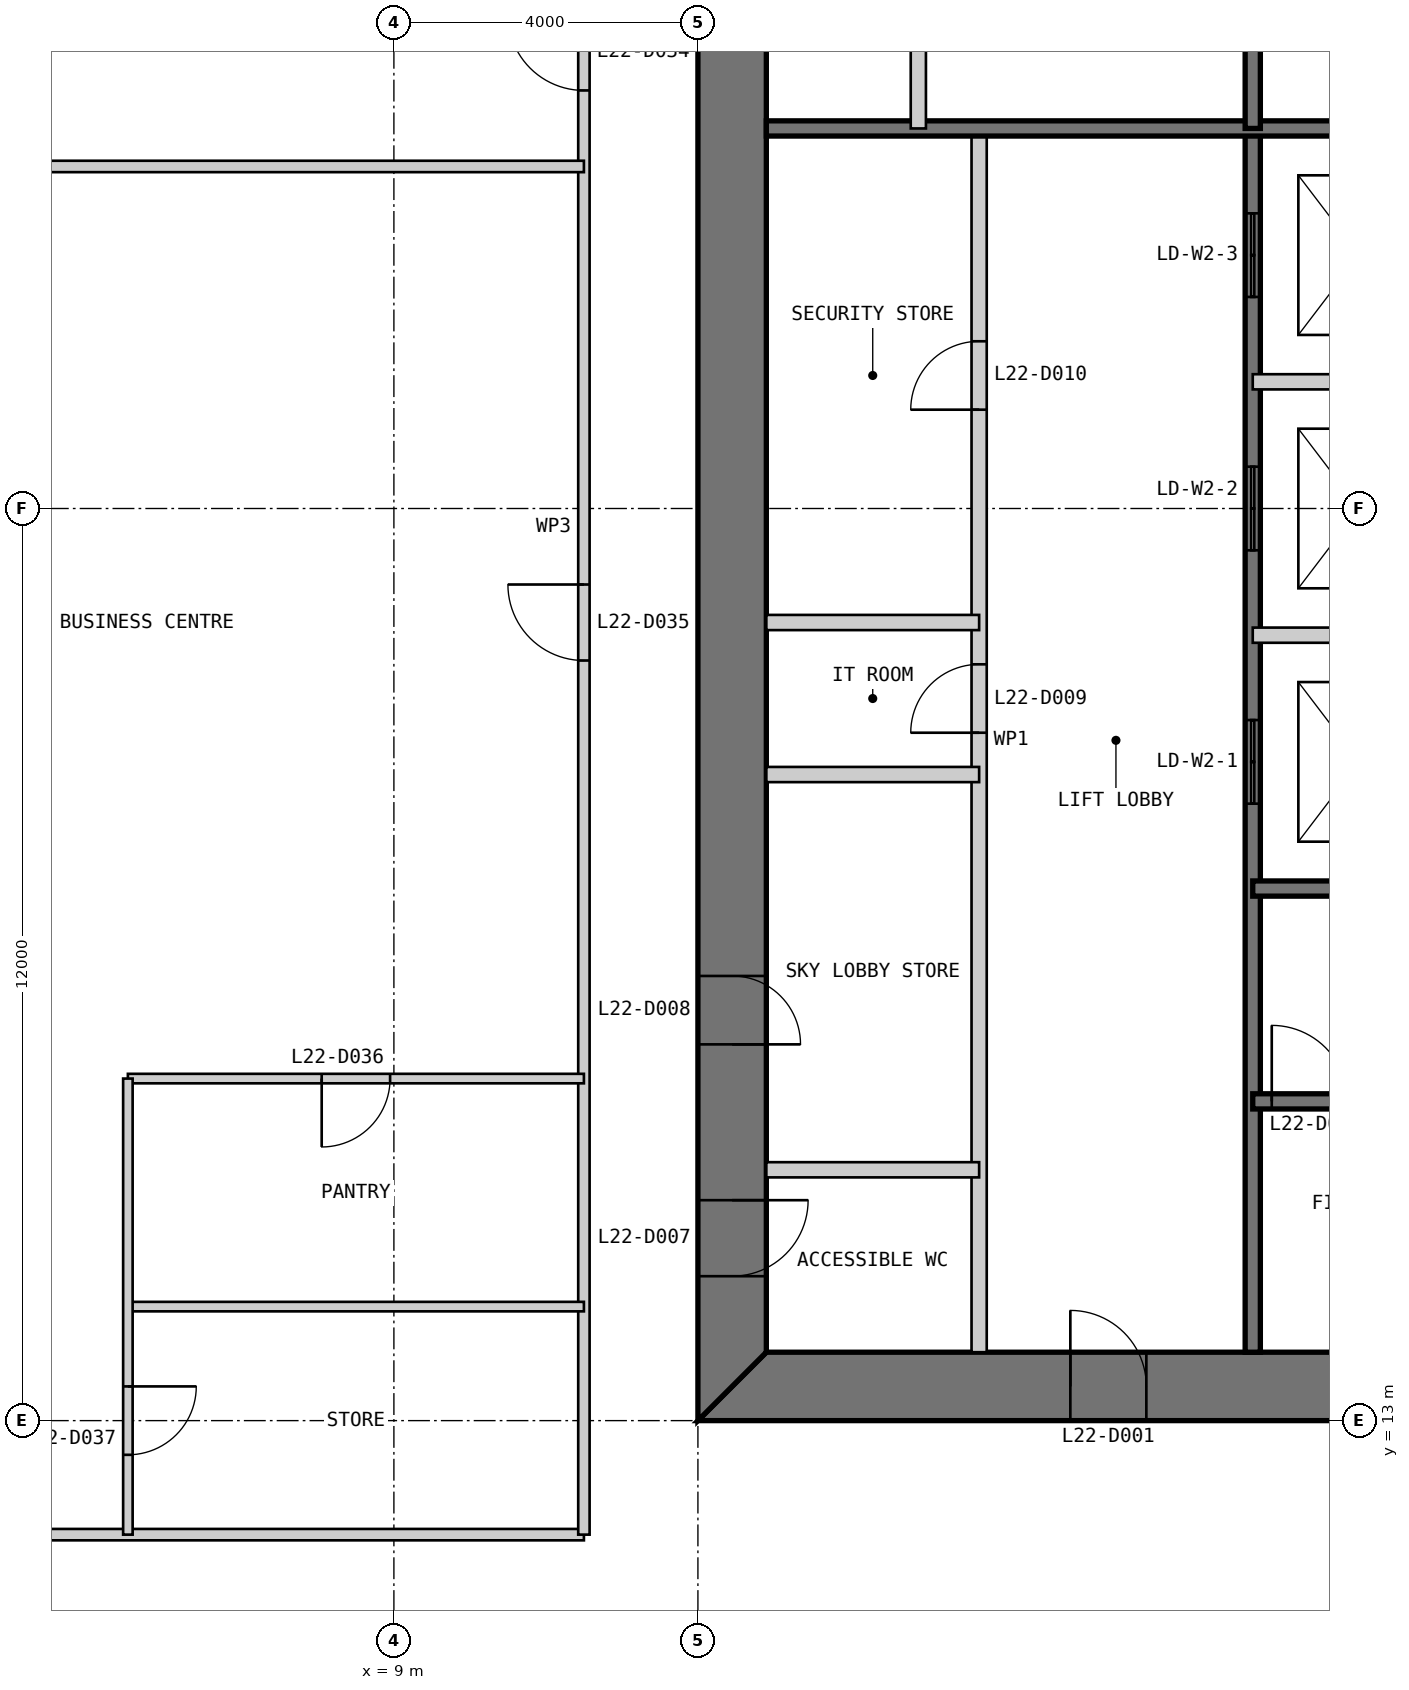
"""IFC4 building model, lengths in metres.
Left out: names, types, materials, properties, quantities, classifications, styles, units other than length and angle.
Written with IfcOpenShell. Run it as: python <this file> out.ifc"""

import sys

from ifc_helpers import new_model, si_unit, direction, frame, frame_2d, origin, place, context, subcontext, project, spatial, polyline, rectangle, outline, extrude, element, fill, save


model = new_model("IFC4")
c1 = context("Model", 3, precision=1e-05, world=origin(), true_north=direction((0.0, 1.0)))
c2 = subcontext(c1, "Body", "Model", "MODEL_VIEW")
j1 = project(units=[si_unit("LENGTHUNIT", "METRE"), si_unit("PLANEANGLEUNIT", "RADIAN")], contexts=[c1])
p1 = place(None, origin())
s1 = spatial("IfcSite", under=j1, at=p1, CompositionType="ELEMENT")
p2 = place(p1, origin())
s2 = spatial("IfcBuilding", under=s1, at=p2, CompositionType="ELEMENT")
p3 = place(p2, frame((0.0, 0.0, 97.0)))
s3 = spatial("IfcBuildingStorey", under=s2, at=p3, CompositionType="ELEMENT", Elevation=97.0)
p4 = place(p3, frame((13.0, 13.45, 0.0), z_axis=(0.0, 0.0, 1.0), x_axis=(1.0, 0.0, 0.0)))
e1 = element("IfcWall", 1, at=p4, inside=s3, PredefinedType="SHEAR", context=c2, shape_type="SweptSolid", body=[
    extrude(outline(polyline([(0.0, -0.45), (24.0, -0.45), (23.1, 0.45), (0.9, 0.45), (0.0, -0.45)])), origin(), (0.0, 0.0, 1.0), 5.4),
])
p5 = place(p4, frame((4.9, 0.0, 0.0)))
e2 = element("IfcOpeningElement", 2, at=p5, cuts=e1, PredefinedType="OPENING", context=c2, shape_type="SweptSolid", body=[
    extrude(rectangle(XDim=1.0, YDim=2.2, at=frame_2d((0.5, 1.1))), frame((0.0, 0.46, 0.0), z_axis=(0.0, -1.0, 0.0), x_axis=(1.0, 0.0, 0.0)), (0.0, 0.0, 1.0), 0.92),
])
p6 = place(p4, frame((8.9, 0.0, 0.0)))
e3 = element("IfcOpeningElement", 3, at=p6, cuts=e1, PredefinedType="OPENING", context=c2, shape_type="SweptSolid", body=[
    extrude(rectangle(XDim=1.1, YDim=2.2, at=frame_2d((0.55, 1.1))), frame((0.0, 0.46, 0.0), z_axis=(0.0, -1.0, 0.0), x_axis=(1.0, 0.0, 0.0)), (0.0, 0.0, 1.0), 0.92),
])
p7 = place(p4, frame((15.05, 0.0, 0.0)))
e4 = element("IfcOpeningElement", 4, at=p7, cuts=e1, PredefinedType="OPENING", context=c2, shape_type="SweptSolid", body=[
    extrude(rectangle(XDim=0.9, YDim=2.2, at=frame_2d((0.45, 1.1))), frame((0.0, 0.46, 0.0), z_axis=(0.0, -1.0, 0.0), x_axis=(1.0, 0.0, 0.0)), (0.0, 0.0, 1.0), 0.92),
])
p8 = place(p4, frame((17.9, 0.0, 0.0)))
e5 = element("IfcOpeningElement", 5, at=p8, cuts=e1, PredefinedType="OPENING", context=c2, shape_type="SweptSolid", body=[
    extrude(rectangle(XDim=1.0, YDim=2.2, at=frame_2d((0.5, 1.1))), frame((0.0, 0.46, 0.0), z_axis=(0.0, -1.0, 0.0), x_axis=(1.0, 0.0, 0.0)), (0.0, 0.0, 1.0), 0.92),
])
p9 = place(p4, frame((21.4, 0.0, 0.0)))
e6 = element("IfcOpeningElement", 6, at=p9, cuts=e1, PredefinedType="OPENING", context=c2, shape_type="SweptSolid", body=[
    extrude(rectangle(XDim=1.0, YDim=2.2, at=frame_2d((0.5, 1.1))), frame((0.0, 0.46, 0.0), z_axis=(0.0, -1.0, 0.0), x_axis=(1.0, 0.0, 0.0)), (0.0, 0.0, 1.0), 0.92),
])
p10 = place(p3, frame((13.45, 36.1, 0.0), z_axis=(0.0, 0.0, 1.0), x_axis=(0.0, -1.0, 0.0)))
e7 = element("IfcWall", 7, at=p10, inside=s3, PredefinedType="SHEAR", context=c2, shape_type="SweptSolid", body=[
    extrude(outline(polyline([(-0.9, -0.45), (23.1, -0.45), (22.2, 0.45), (0.0, 0.45), (-0.9, -0.45)])), origin(), (0.0, 0.0, 1.0), 5.4),
])
p11 = place(p10, frame((20.2, 0.0, 0.0)))
e8 = element("IfcOpeningElement", 8, at=p11, cuts=e7, PredefinedType="OPENING", context=c2, shape_type="SweptSolid", body=[
    extrude(rectangle(XDim=1.0, YDim=2.2, at=frame_2d((0.5, 1.1))), frame((0.0, 0.46, 0.0), z_axis=(0.0, -1.0, 0.0), x_axis=(1.0, 0.0, 0.0)), (0.0, 0.0, 1.0), 0.92),
])
p12 = place(p10, frame((17.25, 0.0, 0.0)))
e9 = element("IfcOpeningElement", 9, at=p12, cuts=e7, PredefinedType="OPENING", context=c2, shape_type="SweptSolid", body=[
    extrude(rectangle(XDim=0.9, YDim=2.2, at=frame_2d((0.45, 1.1))), frame((0.0, 0.46, 0.0), z_axis=(0.0, -1.0, 0.0), x_axis=(1.0, 0.0, 0.0)), (0.0, 0.0, 1.0), 0.92),
])
p13 = place(p3, frame((16.7, 13.9, 0.0), z_axis=(0.0, 0.0, 1.0), x_axis=(0.0, 1.0, 0.0)))
e10 = element("IfcWall", 10, at=p13, inside=s3, PredefinedType="PARTITIONING", context=c2, shape_type="SweptSolid", body=[
    extrude(rectangle(XDim=16.1, YDim=0.2, at=frame_2d((8.05, 0.0))), origin(), (0.0, 0.0, 1.0), 5.2),
])
p14 = place(p13, frame((8.15, 0.0, 0.0)))
e11 = element("IfcOpeningElement", 11, at=p14, cuts=e10, PredefinedType="OPENING", context=c2, shape_type="SweptSolid", body=[
    extrude(rectangle(XDim=0.9, YDim=2.2, at=frame_2d((0.45, 1.1))), frame((0.0, 0.11, 0.0), z_axis=(0.0, -1.0, 0.0), x_axis=(1.0, 0.0, 0.0)), (0.0, 0.0, 1.0), 0.22),
])
p15 = place(p13, frame((12.4, 0.0, 0.0)))
e12 = element("IfcOpeningElement", 12, at=p15, cuts=e10, PredefinedType="OPENING", context=c2, shape_type="SweptSolid", body=[
    extrude(rectangle(XDim=0.9, YDim=2.2, at=frame_2d((0.45, 1.1))), frame((0.0, 0.11, 0.0), z_axis=(0.0, -1.0, 0.0), x_axis=(1.0, 0.0, 0.0)), (0.0, 0.0, 1.0), 0.22),
])
p16 = place(p3, frame((20.3, 13.9, 0.0), z_axis=(0.0, 0.0, 1.0), x_axis=(0.0, 1.0, 0.0)))
e13 = element("IfcWall", 13, at=p16, inside=s3, PredefinedType="SOLIDWALL", context=c2, shape_type="SweptSolid", body=[
    extrude(rectangle(XDim=16.1, YDim=0.2, at=frame_2d((8.05, 0.0))), origin(), (0.0, 0.0, 1.0), 5.2),
])
p17 = place(p16, frame((7.217, 0.0, 0.0)))
e14 = element("IfcOpeningElement", 14, at=p17, cuts=e13, PredefinedType="OPENING", context=c2, shape_type="SweptSolid", body=[
    extrude(rectangle(XDim=1.1, YDim=2.2, at=frame_2d((0.55, 1.1))), frame((0.0, 0.11, 0.0), z_axis=(0.0, -1.0, 0.0), x_axis=(1.0, 0.0, 0.0)), (0.0, 0.0, 1.0), 0.22),
])
p18 = place(p16, frame((10.55, 0.0, 0.0)))
e15 = element("IfcOpeningElement", 15, at=p18, cuts=e13, PredefinedType="OPENING", context=c2, shape_type="SweptSolid", body=[
    extrude(rectangle(XDim=1.1, YDim=2.2, at=frame_2d((0.55, 1.1))), frame((0.0, 0.11, 0.0), z_axis=(0.0, -1.0, 0.0), x_axis=(1.0, 0.0, 0.0)), (0.0, 0.0, 1.0), 0.22),
])
p19 = place(p16, frame((13.883, 0.0, 0.0)))
e16 = element("IfcOpeningElement", 16, at=p19, cuts=e13, PredefinedType="OPENING", context=c2, shape_type="SweptSolid", body=[
    extrude(rectangle(XDim=1.1, YDim=2.2, at=frame_2d((0.55, 1.1))), frame((0.0, 0.11, 0.0), z_axis=(0.0, -1.0, 0.0), x_axis=(1.0, 0.0, 0.0)), (0.0, 0.0, 1.0), 0.22),
])
for number, where, z_axis, x_axis in (
    (17, (20.3, 23.333, 0.0), (0.0, 0.0, 1.0), (1.0, 0.0, 0.0)),
    (18, (20.3, 26.667, 0.0), (0.0, 0.0, 1.0), (1.0, 0.0, 0.0)),
):
    element("IfcWall", number, at=place(p3, frame(where, z_axis=z_axis, x_axis=x_axis)), inside=s3, PredefinedType="PARTITIONING", context=c2, shape_type="SweptSolid", body=[
        extrude(rectangle(XDim=2.8, YDim=0.2, at=frame_2d((1.4, 0.0))), origin(), (0.0, 0.0, 1.0), 5.2),
    ])
p20 = place(p3, frame((20.3, 17.2, 0.0), z_axis=(0.0, 0.0, 1.0), x_axis=(1.0, 0.0, 0.0)))
e19 = element("IfcWall", 19, at=p20, inside=s3, PredefinedType="SOLIDWALL", context=c2, shape_type="SweptSolid", body=[
    extrude(rectangle(XDim=9.4, YDim=0.2, at=frame_2d((4.7, 0.0))), origin(), (0.0, 0.0, 1.0), 5.2),
])
p21 = place(p20, frame((0.25, 0.0, 0.0)))
e20 = element("IfcOpeningElement", 20, at=p21, cuts=e19, PredefinedType="OPENING", context=c2, shape_type="SweptSolid", body=[
    extrude(rectangle(XDim=1.0, YDim=2.2, at=frame_2d((0.5, 1.1))), frame((0.0, 0.11, 0.0), z_axis=(0.0, -1.0, 0.0), x_axis=(1.0, 0.0, 0.0)), (0.0, 0.0, 1.0), 0.22),
])
p22 = place(p3, frame((20.3, 20.0, 0.0), z_axis=(0.0, 0.0, 1.0), x_axis=(1.0, 0.0, 0.0)))
e21 = element("IfcWall", 21, at=p22, inside=s3, PredefinedType="SOLIDWALL", context=c2, shape_type="SweptSolid", body=[
    extrude(rectangle(XDim=15.8, YDim=0.2, at=frame_2d((7.9, 0.0))), origin(), (0.0, 0.0, 1.0), 5.2),
])
for number, where, z_axis, x_axis in (
    (22, (13.9, 16.3, 0.0), (0.0, 0.0, 1.0), (1.0, 0.0, 0.0)),
    (23, (13.9, 21.5, 0.0), (0.0, 0.0, 1.0), (1.0, 0.0, 0.0)),
    (24, (13.9, 23.5, 0.0), (0.0, 0.0, 1.0), (1.0, 0.0, 0.0)),
):
    element("IfcWall", number, at=place(p3, frame(where, z_axis=z_axis, x_axis=x_axis)), inside=s3, PredefinedType="PARTITIONING", context=c2, shape_type="SweptSolid", body=[
        extrude(rectangle(XDim=2.8, YDim=0.2, at=frame_2d((1.4, 0.0))), origin(), (0.0, 0.0, 1.0), 5.2),
    ])
p23 = place(p3, frame((29.7, 30.0, 0.0), z_axis=(0.0, 0.0, 1.0), x_axis=(-1.0, 0.0, 0.0)))
e25 = element("IfcWall", 25, at=p23, inside=s3, PredefinedType="SOLIDWALL", context=c2, shape_type="SweptSolid", body=[
    extrude(rectangle(XDim=15.8, YDim=0.2, at=frame_2d((7.9, 0.0))), origin(), (0.0, 0.0, 1.0), 5.2),
])
p24 = place(p3, frame((20.3, 36.1, 0.0), z_axis=(0.0, 0.0, 1.0), x_axis=(0.0, -1.0, 0.0)))
e26 = element("IfcWall", 26, at=p24, inside=s3, PredefinedType="SOLIDWALL", context=c2, shape_type="SweptSolid", body=[
    extrude(rectangle(XDim=6.1, YDim=0.2, at=frame_2d((3.05, 0.0))), origin(), (0.0, 0.0, 1.0), 5.2),
])
p25 = place(p3, frame((15.9, 36.1, 0.0), z_axis=(0.0, 0.0, 1.0), x_axis=(0.0, -1.0, 0.0)))
e27 = element("IfcWall", 27, at=p25, inside=s3, PredefinedType="PARTITIONING", context=c2, shape_type="SweptSolid", body=[
    extrude(rectangle(XDim=6.1, YDim=0.2, at=frame_2d((3.05, 0.0))), origin(), (0.0, 0.0, 1.0), 5.2),
])
p26 = place(p3, frame((0.15, 11.5, 0.0), z_axis=(0.0, 0.0, 1.0), x_axis=(1.0, 0.0, 0.0)))
e28 = element("IfcWall", 28, at=p26, inside=s3, PredefinedType="PARTITIONING", context=c2, shape_type="SweptSolid", body=[
    extrude(rectangle(XDim=11.35, YDim=0.15, at=frame_2d((5.675, 0.0))), origin(), (0.0, 0.0, 1.0), 5.25),
])
p27 = place(p3, frame((11.5, 38.5, 0.0), z_axis=(0.0, 0.0, 1.0), x_axis=(0.0, -1.0, 0.0)))
e29 = element("IfcWall", 29, at=p27, inside=s3, PredefinedType="PARTITIONING", context=c2, shape_type="SweptSolid", body=[
    extrude(rectangle(XDim=27.0, YDim=0.15, at=frame_2d((13.5, 0.0))), origin(), (0.0, 0.0, 1.0), 5.25),
])
p28 = place(p27, frame((2.5, 0.0, 0.0)))
e30 = element("IfcOpeningElement", 30, at=p28, cuts=e29, PredefinedType="OPENING", context=c2, shape_type="SweptSolid", body=[
    extrude(rectangle(XDim=1.0, YDim=2.2, at=frame_2d((0.5, 1.1))), frame((0.0, 0.085, 0.0), z_axis=(0.0, -1.0, 0.0), x_axis=(1.0, 0.0, 0.0)), (0.0, 0.0, 1.0), 0.17),
])
p29 = place(p27, frame((7.0, 0.0, 0.0)))
e31 = element("IfcOpeningElement", 31, at=p29, cuts=e29, PredefinedType="OPENING", context=c2, shape_type="SweptSolid", body=[
    extrude(rectangle(XDim=1.0, YDim=2.2, at=frame_2d((0.5, 1.1))), frame((0.0, 0.085, 0.0), z_axis=(0.0, -1.0, 0.0), x_axis=(1.0, 0.0, 0.0)), (0.0, 0.0, 1.0), 0.17),
])
p30 = place(p27, frame((14.5, 0.0, 0.0)))
e32 = element("IfcOpeningElement", 32, at=p30, cuts=e29, PredefinedType="OPENING", context=c2, shape_type="SweptSolid", body=[
    extrude(rectangle(XDim=1.0, YDim=2.2, at=frame_2d((0.5, 1.1))), frame((0.0, 0.085, 0.0), z_axis=(0.0, -1.0, 0.0), x_axis=(1.0, 0.0, 0.0)), (0.0, 0.0, 1.0), 0.17),
])
p31 = place(p3, frame((0.15, 29.5, 0.0), z_axis=(0.0, 0.0, 1.0), x_axis=(1.0, 0.0, 0.0)))
e33 = element("IfcWall", 33, at=p31, inside=s3, PredefinedType="PARTITIONING", context=c2, shape_type="SweptSolid", body=[
    extrude(rectangle(XDim=11.35, YDim=0.15, at=frame_2d((5.675, 0.0))), origin(), (0.0, 0.0, 1.0), 5.25),
])
p32 = place(p3, frame((5.5, 17.5, 0.0), z_axis=(0.0, 0.0, 1.0), x_axis=(1.0, 0.0, 0.0)))
e34 = element("IfcWall", 34, at=p32, inside=s3, PredefinedType="PARTITIONING", context=c2, shape_type="SweptSolid", body=[
    extrude(rectangle(XDim=6.0, YDim=0.125, at=frame_2d((3.0, 0.0))), origin(), (0.0, 0.0, 1.0), 5.25),
])
p33 = place(p32, frame((2.55, 0.0, 0.0)))
e35 = element("IfcOpeningElement", 35, at=p33, cuts=e34, PredefinedType="OPENING", context=c2, shape_type="SweptSolid", body=[
    extrude(rectangle(XDim=0.9, YDim=2.2, at=frame_2d((0.45, 1.1))), frame((0.0, 0.073, 0.0), z_axis=(0.0, -1.0, 0.0), x_axis=(1.0, 0.0, 0.0)), (0.0, 0.0, 1.0), 0.145),
])
p34 = place(p3, frame((5.5, 14.5, 0.0), z_axis=(0.0, 0.0, 1.0), x_axis=(1.0, 0.0, 0.0)))
e36 = element("IfcWall", 36, at=p34, inside=s3, PredefinedType="PARTITIONING", context=c2, shape_type="SweptSolid", body=[
    extrude(rectangle(XDim=6.0, YDim=0.125, at=frame_2d((3.0, 0.0))), origin(), (0.0, 0.0, 1.0), 5.25),
])
p35 = place(p3, frame((5.5, 17.5, 0.0), z_axis=(0.0, 0.0, 1.0), x_axis=(0.0, -1.0, 0.0)))
e37 = element("IfcWall", 37, at=p35, inside=s3, PredefinedType="PARTITIONING", context=c2, shape_type="SweptSolid", body=[
    extrude(rectangle(XDim=6.0, YDim=0.125, at=frame_2d((3.0, 0.0))), origin(), (0.0, 0.0, 1.0), 5.25),
])
p36 = place(p35, frame((4.05, 0.0, 0.0)))
e38 = element("IfcOpeningElement", 38, at=p36, cuts=e37, PredefinedType="OPENING", context=c2, shape_type="SweptSolid", body=[
    extrude(rectangle(XDim=0.9, YDim=2.2, at=frame_2d((0.45, 1.1))), frame((0.0, 0.073, 0.0), z_axis=(0.0, -1.0, 0.0), x_axis=(1.0, 0.0, 0.0)), (0.0, 0.0, 1.0), 0.145),
])
p37 = place(p5, origin())
e39 = element("IfcDoor", 39, at=p37, inside=s3, OperationType="SINGLE_SWING_LEFT", PredefinedType="DOOR", context=c2, shape_type="SweptSolid", body=[
    extrude(rectangle(XDim=1.0, YDim=2.2, at=frame_2d((0.5, 1.1))), frame((0.0, 0.025, 0.0), z_axis=(0.0, -1.0, 0.0), x_axis=(1.0, 0.0, 0.0)), (0.0, 0.0, 1.0), 0.05),
    extrude(outline(polyline([(0.0, 0.0), (0.04, 0.0), (0.04, 2.16), (0.96, 2.16), (0.96, 0.0), (1.0, 0.0), (1.0, 2.2), (0.0, 2.2), (0.0, 0.0)])), frame((0.0, 0.3, 0.0), z_axis=(0.0, -1.0, 0.0), x_axis=(1.0, 0.0, 0.0)), (0.0, 0.0, 1.0), 0.6),
])
fill(e2, e39)
p38 = place(p21, origin())
e40 = element("IfcDoor", 40, at=p38, inside=s3, OperationType="SINGLE_SWING_LEFT", PredefinedType="DOOR", context=c2, shape_type="SweptSolid", body=[
    extrude(rectangle(XDim=1.0, YDim=2.2, at=frame_2d((0.5, 1.1))), frame((0.0, 0.025, 0.0), z_axis=(0.0, -1.0, 0.0), x_axis=(1.0, 0.0, 0.0)), (0.0, 0.0, 1.0), 0.05),
])
fill(e20, e40)
p39 = place(p11, origin())
e41 = element("IfcDoor", 41, at=p39, inside=s3, OperationType="SINGLE_SWING_LEFT", PredefinedType="DOOR", context=c2, shape_type="SweptSolid", body=[
    extrude(rectangle(XDim=1.0, YDim=2.2, at=frame_2d((0.5, 1.1))), frame((0.0, 0.025, 0.0), z_axis=(0.0, -1.0, 0.0), x_axis=(1.0, 0.0, 0.0)), (0.0, 0.0, 1.0), 0.05),
    extrude(outline(polyline([(0.0, 0.0), (0.04, 0.0), (0.04, 2.16), (0.96, 2.16), (0.96, 0.0), (1.0, 0.0), (1.0, 2.2), (0.0, 2.2), (0.0, 0.0)])), frame((0.0, 0.3, 0.0), z_axis=(0.0, -1.0, 0.0), x_axis=(1.0, 0.0, 0.0)), (0.0, 0.0, 1.0), 0.6),
])
fill(e8, e41)
p40 = place(p12, origin())
e42 = element("IfcDoor", 42, at=p40, inside=s3, OperationType="SINGLE_SWING_RIGHT", PredefinedType="DOOR", context=c2, shape_type="SweptSolid", body=[
    extrude(rectangle(XDim=0.9, YDim=2.2, at=frame_2d((0.45, 1.1))), frame((0.0, 0.025, 0.0), z_axis=(0.0, -1.0, 0.0), x_axis=(1.0, 0.0, 0.0)), (0.0, 0.0, 1.0), 0.05),
    extrude(outline(polyline([(0.0, 0.0), (0.04, 0.0), (0.04, 2.16), (0.86, 2.16), (0.86, 0.0), (0.9, 0.0), (0.9, 2.2), (0.0, 2.2), (0.0, 0.0)])), frame((0.0, 0.3, 0.0), z_axis=(0.0, -1.0, 0.0), x_axis=(1.0, 0.0, 0.0)), (0.0, 0.0, 1.0), 0.6),
])
fill(e9, e42)
p41 = place(p14, origin())
e43 = element("IfcDoor", 43, at=p41, inside=s3, OperationType="SINGLE_SWING_LEFT", PredefinedType="DOOR", context=c2, shape_type="SweptSolid", body=[
    extrude(rectangle(XDim=0.9, YDim=2.2, at=frame_2d((0.45, 1.1))), frame((0.0, 0.025, 0.0), z_axis=(0.0, -1.0, 0.0), x_axis=(1.0, 0.0, 0.0)), (0.0, 0.0, 1.0), 0.05),
])
fill(e11, e43)
p42 = place(p15, origin())
e44 = element("IfcDoor", 44, at=p42, inside=s3, OperationType="SINGLE_SWING_LEFT", PredefinedType="DOOR", context=c2, shape_type="SweptSolid", body=[
    extrude(rectangle(XDim=0.9, YDim=2.2, at=frame_2d((0.45, 1.1))), frame((0.0, 0.025, 0.0), z_axis=(0.0, -1.0, 0.0), x_axis=(1.0, 0.0, 0.0)), (0.0, 0.0, 1.0), 0.05),
])
fill(e12, e44)
p43 = place(p29, frame((1.0, 0.0, 0.0), z_axis=(0.0, 0.0, 1.0), x_axis=(-1.0, 0.0, 0.0)))
e45 = element("IfcDoor", 45, at=p43, inside=s3, OperationType="SINGLE_SWING_RIGHT", PredefinedType="DOOR", context=c2, shape_type="SweptSolid", body=[
    extrude(rectangle(XDim=1.0, YDim=2.2, at=frame_2d((0.5, 1.1))), frame((0.0, 0.025, 0.0), z_axis=(0.0, -1.0, 0.0), x_axis=(1.0, 0.0, 0.0)), (0.0, 0.0, 1.0), 0.05),
])
fill(e31, e45)
p44 = place(p30, frame((1.0, 0.0, 0.0), z_axis=(0.0, 0.0, 1.0), x_axis=(-1.0, 0.0, 0.0)))
e46 = element("IfcDoor", 46, at=p44, inside=s3, OperationType="SINGLE_SWING_RIGHT", PredefinedType="DOOR", context=c2, shape_type="SweptSolid", body=[
    extrude(rectangle(XDim=1.0, YDim=2.2, at=frame_2d((0.5, 1.1))), frame((0.0, 0.025, 0.0), z_axis=(0.0, -1.0, 0.0), x_axis=(1.0, 0.0, 0.0)), (0.0, 0.0, 1.0), 0.05),
])
fill(e32, e46)
p45 = place(p33, frame((0.9, 0.0, 0.0), z_axis=(0.0, 0.0, 1.0), x_axis=(-1.0, 0.0, 0.0)))
e47 = element("IfcDoor", 47, at=p45, inside=s3, OperationType="SINGLE_SWING_RIGHT", PredefinedType="DOOR", context=c2, shape_type="SweptSolid", body=[
    extrude(rectangle(XDim=0.9, YDim=2.2, at=frame_2d((0.45, 1.1))), frame((0.0, 0.025, 0.0), z_axis=(0.0, -1.0, 0.0), x_axis=(1.0, 0.0, 0.0)), (0.0, 0.0, 1.0), 0.05),
])
fill(e35, e47)
p46 = place(p36, origin())
e48 = element("IfcDoor", 48, at=p46, inside=s3, OperationType="SINGLE_SWING_LEFT", PredefinedType="DOOR", context=c2, shape_type="SweptSolid", body=[
    extrude(rectangle(XDim=0.9, YDim=2.2, at=frame_2d((0.45, 1.1))), frame((0.0, 0.025, 0.0), z_axis=(0.0, -1.0, 0.0), x_axis=(1.0, 0.0, 0.0)), (0.0, 0.0, 1.0), 0.05),
])
fill(e38, e48)
p47 = place(p17, origin())
e49 = element("IfcDoor", 49, at=p47, inside=s3, OperationType="DOUBLE_DOOR_SLIDING", PredefinedType="DOOR", context=c2, shape_type="SweptSolid", body=[
    extrude(rectangle(XDim=1.1, YDim=2.2, at=frame_2d((0.55, 1.1))), frame((0.0, 0.025, 0.0), z_axis=(0.0, -1.0, 0.0), x_axis=(1.0, 0.0, 0.0)), (0.0, 0.0, 1.0), 0.05),
])
fill(e14, e49)
p48 = place(p18, origin())
e50 = element("IfcDoor", 50, at=p48, inside=s3, OperationType="DOUBLE_DOOR_SLIDING", PredefinedType="DOOR", context=c2, shape_type="SweptSolid", body=[
    extrude(rectangle(XDim=1.1, YDim=2.2, at=frame_2d((0.55, 1.1))), frame((0.0, 0.025, 0.0), z_axis=(0.0, -1.0, 0.0), x_axis=(1.0, 0.0, 0.0)), (0.0, 0.0, 1.0), 0.05),
])
fill(e15, e50)
p49 = place(p19, origin())
e51 = element("IfcDoor", 51, at=p49, inside=s3, OperationType="DOUBLE_DOOR_SLIDING", PredefinedType="DOOR", context=c2, shape_type="SweptSolid", body=[
    extrude(rectangle(XDim=1.1, YDim=2.2, at=frame_2d((0.55, 1.1))), frame((0.0, 0.025, 0.0), z_axis=(0.0, -1.0, 0.0), x_axis=(1.0, 0.0, 0.0)), (0.0, 0.0, 1.0), 0.05),
])
fill(e16, e51)
save(model, sys.argv[1])
